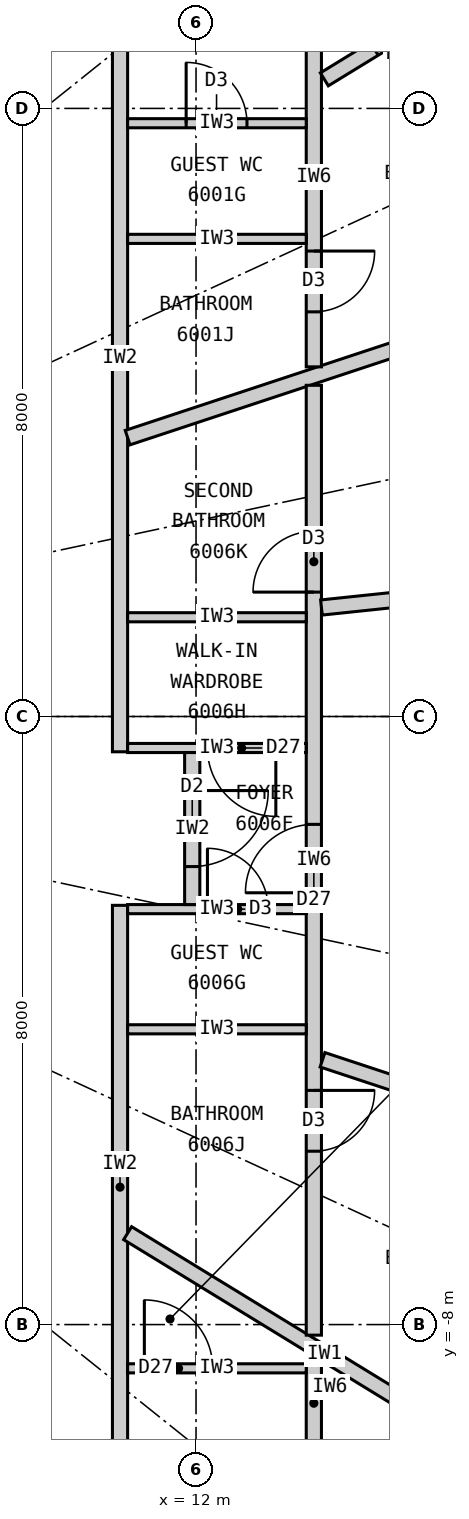
"""IFC4 building model, lengths in metres.
Left out: names, types, materials, properties, quantities, classifications, styles, units other than length and angle.
Written with IfcOpenShell. Run it as: python <this file> out.ifc"""

import sys

from ifc_helpers import new_model, si_unit, direction, frame, frame_2d, origin, place, context, subcontext, project, spatial, rectangle, extrude, element, fill, save


model = new_model("IFC4")
c1 = context("Model", 3, precision=1e-05, world=origin(), true_north=direction((0.0, 1.0)))
c2 = subcontext(c1, "Body", "Model", "MODEL_VIEW")
j1 = project(units=[si_unit("LENGTHUNIT", "METRE"), si_unit("PLANEANGLEUNIT", "RADIAN")], contexts=[c1])
p1 = place(None, origin())
s1 = spatial("IfcSite", under=j1, at=p1, CompositionType="ELEMENT")
p2 = place(p1, origin())
s2 = spatial("IfcBuilding", under=s1, at=p2, CompositionType="ELEMENT")
p3 = place(p2, frame((0.0, 0.0, 222.6)))
s3 = spatial("IfcBuildingStorey", under=s2, at=p3, CompositionType="ELEMENT", Elevation=222.6)
p4 = place(p3, frame((11.0, -9.9, 0.0), z_axis=(0.0, 0.0, 1.0), x_axis=(0.0, 1.0, 0.0)))
e1 = element("IfcWall", 1, at=p4, inside=s3, PredefinedType="PARTITIONING", context=c2, shape_type="SweptSolid", body=[
    extrude(rectangle(XDim=7.416, YDim=0.2, at=frame_2d((3.708, 0.0))), origin(), (0.0, 0.0, 1.0), 3.12),
])
p5 = place(p3, frame((11.0, -0.464, 0.0), z_axis=(0.0, 0.0, 1.0), x_axis=(0.0, 1.0, 0.0)))
e2 = element("IfcWall", 2, at=p5, inside=s3, PredefinedType="PARTITIONING", context=c2, shape_type="SweptSolid", body=[
    extrude(rectangle(XDim=10.364, YDim=0.2, at=frame_2d((5.182, 0.0))), origin(), (0.0, 0.0, 1.0), 3.12),
])
p6 = place(p3, frame((11.1, 3.669, 0.0), z_axis=(0.0, 0.0, 1.0), x_axis=(0.949476668397, 0.313837627079, 0.0)))
e3 = element("IfcWall", 3, at=p6, inside=s3, PredefinedType="PARTITIONING", context=c2, shape_type="SweptSolid", body=[
    extrude(rectangle(XDim=8.339, YDim=0.2, at=frame_2d((4.169, 0.0))), origin(), (0.0, 0.0, 1.0), 3.12),
])
p7 = place(p3, frame((11.1, -6.797, 0.0), z_axis=(0.0, 0.0, 1.0), x_axis=(0.852799818179, -0.522237943963, 0.0)))
e4 = element("IfcWall", 4, at=p7, inside=s3, PredefinedType="PARTITIONING", context=c2, shape_type="SweptSolid", body=[
    extrude(rectangle(XDim=6.077, YDim=0.2, at=frame_2d((3.039, 0.0))), origin(), (0.0, 0.0, 1.0), 3.12),
])
p8 = place(p3, frame((13.55, 4.6, 0.0), z_axis=(0.0, 0.0, 1.0), x_axis=(0.0, 1.0, 0.0)))
e5 = element("IfcWall", 5, at=p8, inside=s3, PredefinedType="PARTITIONING", context=c2, shape_type="SweptSolid", body=[
    extrude(rectangle(XDim=5.009, YDim=0.2, at=frame_2d((2.504, 0.0))), origin(), (0.0, 0.0, 1.0), 3.12),
])
p9 = place(p8, frame((0.724, 0.0, 0.0)))
e6 = element("IfcOpeningElement", 6, at=p9, cuts=e5, PredefinedType="OPENING", context=c2, shape_type="SweptSolid", body=[
    extrude(rectangle(XDim=0.8, YDim=2.1, at=frame_2d((0.4, 1.05))), frame((0.0, 0.11, 0.0), z_axis=(0.0, -1.0, 0.0), x_axis=(1.0, 0.0, 0.0)), (0.0, 0.0, 1.0), 0.22),
])
p10 = place(p3, frame((13.688, 8.382, 0.0), z_axis=(0.0, 0.0, 1.0), x_axis=(0.852783459586, 0.522264656144, 0.0)))
e7 = element("IfcWall", 7, at=p10, inside=s3, PredefinedType="PARTITIONING", context=c2, shape_type="SweptSolid", body=[
    extrude(rectangle(XDim=3.042, YDim=0.2, at=frame_2d((1.521, 0.0))), origin(), (0.0, 0.0, 1.0), 3.12),
])
p11 = place(p10, frame((0.77, 0.0, 0.0)))
e8 = element("IfcOpeningElement", 8, at=p11, cuts=e7, PredefinedType="OPENING", context=c2, shape_type="SweptSolid", body=[
    extrude(rectangle(XDim=0.9, YDim=2.1, at=frame_2d((0.45, 1.05))), frame((0.0, 0.11, 0.0), z_axis=(0.0, -1.0, 0.0), x_axis=(1.0, 0.0, 0.0)), (0.0, 0.0, 1.0), 0.22),
])
p12 = place(p3, frame((11.1, 6.284, 0.0), z_axis=(0.0, 0.0, 1.0), x_axis=(1.0, 0.0, 0.0)))
e9 = element("IfcWall", 9, at=p12, inside=s3, PredefinedType="PARTITIONING", context=c2, shape_type="SweptSolid", body=[
    extrude(rectangle(XDim=2.35, YDim=0.12, at=frame_2d((1.175, 0.0))), origin(), (0.0, 0.0, 1.0), 3.12),
])
p13 = place(p3, frame((11.1, 7.805, 0.0), z_axis=(0.0, 0.0, 1.0), x_axis=(1.0, 0.0, 0.0)))
e10 = element("IfcWall", 10, at=p13, inside=s3, PredefinedType="PARTITIONING", context=c2, shape_type="SweptSolid", body=[
    extrude(rectangle(XDim=2.35, YDim=0.12, at=frame_2d((1.175, 0.0))), origin(), (0.0, 0.0, 1.0), 3.12),
])
p14 = place(p13, frame((0.77, 0.0, 0.0)))
e11 = element("IfcOpeningElement", 11, at=p14, cuts=e10, PredefinedType="OPENING", context=c2, shape_type="SweptSolid", body=[
    extrude(rectangle(XDim=0.8, YDim=2.1, at=frame_2d((0.4, 1.05))), frame((0.0, 0.07, 0.0), z_axis=(0.0, -1.0, 0.0), x_axis=(1.0, 0.0, 0.0)), (0.0, 0.0, 1.0), 0.14),
])
p15 = place(p3, frame((13.55, -9.609, 0.0), z_axis=(0.0, 0.0, 1.0), x_axis=(0.0, 1.0, 0.0)))
e12 = element("IfcWall", 12, at=p15, inside=s3, PredefinedType="PARTITIONING", context=c2, shape_type="SweptSolid", body=[
    extrude(rectangle(XDim=1.148, YDim=0.2, at=frame_2d((0.574, 0.0))), origin(), (0.0, 0.0, 1.0), 3.12),
])
p16 = place(p3, frame((11.1, -8.576, 0.0), z_axis=(0.0, 0.0, 1.0), x_axis=(1.0, 0.0, 0.0)))
e13 = element("IfcWall", 13, at=p16, inside=s3, PredefinedType="PARTITIONING", context=c2, shape_type="SweptSolid", body=[
    extrude(rectangle(XDim=2.35, YDim=0.12, at=frame_2d((1.175, 0.0))), origin(), (0.0, 0.0, 1.0), 3.12),
])
p17 = place(p16, frame((0.22, 0.0, 0.0)))
e14 = element("IfcOpeningElement", 14, at=p17, cuts=e13, PredefinedType="OPENING", context=c2, shape_type="SweptSolid", body=[
    extrude(rectangle(XDim=0.9, YDim=2.1, at=frame_2d((0.45, 1.05))), frame((0.0, 0.07, 0.0), z_axis=(0.0, -1.0, 0.0), x_axis=(1.0, 0.0, 0.0)), (0.0, 0.0, 1.0), 0.14),
])
p18 = place(p3, frame((13.55, -8.139, 0.0), z_axis=(0.0, 0.0, 1.0), x_axis=(0.0, 1.0, 0.0)))
e15 = element("IfcWall", 15, at=p18, inside=s3, PredefinedType="PARTITIONING", context=c2, shape_type="SweptSolid", body=[
    extrude(rectangle(XDim=12.496, YDim=0.2, at=frame_2d((6.248, 0.0))), origin(), (0.0, 0.0, 1.0), 3.12),
])
p19 = place(p18, frame((2.42, 0.0, 0.0)))
e16 = element("IfcOpeningElement", 16, at=p19, cuts=e15, PredefinedType="OPENING", context=c2, shape_type="SweptSolid", body=[
    extrude(rectangle(XDim=0.8, YDim=2.1, at=frame_2d((0.4, 1.05))), frame((0.0, 0.11, 0.0), z_axis=(0.0, -1.0, 0.0), x_axis=(1.0, 0.0, 0.0)), (0.0, 0.0, 1.0), 0.22),
])
p20 = place(p18, frame((9.776, 0.0, 0.0)))
e17 = element("IfcOpeningElement", 17, at=p20, cuts=e15, PredefinedType="OPENING", context=c2, shape_type="SweptSolid", body=[
    extrude(rectangle(XDim=0.8, YDim=2.1, at=frame_2d((0.4, 1.05))), frame((0.0, 0.11, 0.0), z_axis=(0.0, -1.0, 0.0), x_axis=(1.0, 0.0, 0.0)), (0.0, 0.0, 1.0), 0.22),
])
p21 = place(p18, frame((5.82, 0.0, 0.0)))
e18 = element("IfcOpeningElement", 18, at=p21, cuts=e15, PredefinedType="OPENING", context=c2, shape_type="SweptSolid", body=[
    extrude(rectangle(XDim=0.9, YDim=2.1, at=frame_2d((0.45, 1.05))), frame((0.0, 0.11, 0.0), z_axis=(0.0, -1.0, 0.0), x_axis=(1.0, 0.0, 0.0)), (0.0, 0.0, 1.0), 0.22),
])
p22 = place(p3, frame((13.664, -4.516, 0.0), z_axis=(0.0, 0.0, 1.0), x_axis=(0.949481375941, -0.313823384632, 0.0)))
e19 = element("IfcWall", 19, at=p22, inside=s3, PredefinedType="PARTITIONING", context=c2, shape_type="SweptSolid", body=[
    extrude(rectangle(XDim=5.638, YDim=0.2, at=frame_2d((2.819, 0.0))), origin(), (0.0, 0.0, 1.0), 3.12),
])
p23 = place(p22, frame((1.82, 0.0, 0.0)))
e20 = element("IfcOpeningElement", 20, at=p23, cuts=e19, PredefinedType="OPENING", context=c2, shape_type="SweptSolid", body=[
    extrude(rectangle(XDim=0.9, YDim=2.1, at=frame_2d((0.45, 1.05))), frame((0.0, 0.11, 0.0), z_axis=(0.0, -1.0, 0.0), x_axis=(1.0, 0.0, 0.0)), (0.0, 0.0, 1.0), 0.22),
])
p24 = place(p3, frame((13.65, 1.434, 0.0), z_axis=(0.0, 0.0, 1.0), x_axis=(0.994526954268, 0.10448031984, 0.0)))
e21 = element("IfcWall", 21, at=p24, inside=s3, PredefinedType="PARTITIONING", context=c2, shape_type="SweptSolid", body=[
    extrude(rectangle(XDim=6.837, YDim=0.2, at=frame_2d((3.418, 0.0))), origin(), (0.0, 0.0, 1.0), 2.47),
])
p25 = place(p24, frame((2.27, 0.0, 0.0)))
e22 = element("IfcOpeningElement", 22, at=p25, cuts=e21, PredefinedType="OPENING", context=c2, shape_type="SweptSolid", body=[
    extrude(rectangle(XDim=0.9, YDim=2.1, at=frame_2d((0.45, 1.05))), frame((0.0, 0.11, 0.0), z_axis=(0.0, -1.0, 0.0), x_axis=(1.0, 0.0, 0.0)), (0.0, 0.0, 1.0), 0.22),
])
p26 = place(p3, frame((11.1, -4.115, 0.0), z_axis=(0.0, 0.0, 1.0), x_axis=(1.0, 0.0, 0.0)))
e23 = element("IfcWall", 23, at=p26, inside=s3, PredefinedType="PARTITIONING", context=c2, shape_type="SweptSolid", body=[
    extrude(rectangle(XDim=2.35, YDim=0.12, at=frame_2d((1.175, 0.0))), origin(), (0.0, 0.0, 1.0), 3.12),
])
p27 = place(p3, frame((11.1, -2.534, 0.0), z_axis=(0.0, 0.0, 1.0), x_axis=(1.0, 0.0, 0.0)))
e24 = element("IfcWall", 24, at=p27, inside=s3, PredefinedType="PARTITIONING", context=c2, shape_type="SweptSolid", body=[
    extrude(rectangle(XDim=2.35, YDim=0.12, at=frame_2d((1.175, 0.0))), origin(), (0.0, 0.0, 1.0), 3.12),
])
p28 = place(p27, frame((1.05, 0.0, 0.0)))
e25 = element("IfcOpeningElement", 25, at=p28, cuts=e24, PredefinedType="OPENING", context=c2, shape_type="SweptSolid", body=[
    extrude(rectangle(XDim=0.8, YDim=2.1, at=frame_2d((0.4, 1.05))), frame((0.0, 0.07, 0.0), z_axis=(0.0, -1.0, 0.0), x_axis=(1.0, 0.0, 0.0)), (0.0, 0.0, 1.0), 0.14),
])
p29 = place(p3, frame((11.1, -0.414, 0.0), z_axis=(0.0, 0.0, 1.0), x_axis=(1.0, 0.0, 0.0)))
e26 = element("IfcWall", 26, at=p29, inside=s3, PredefinedType="PARTITIONING", context=c2, shape_type="SweptSolid", body=[
    extrude(rectangle(XDim=2.35, YDim=0.12, at=frame_2d((1.175, 0.0))), origin(), (0.0, 0.0, 1.0), 3.12),
])
p30 = place(p29, frame((1.05, 0.0, 0.0)))
e27 = element("IfcOpeningElement", 27, at=p30, cuts=e26, PredefinedType="OPENING", context=c2, shape_type="SweptSolid", body=[
    extrude(rectangle(XDim=0.9, YDim=2.1, at=frame_2d((0.45, 1.05))), frame((0.0, 0.07, 0.0), z_axis=(0.0, -1.0, 0.0), x_axis=(1.0, 0.0, 0.0)), (0.0, 0.0, 1.0), 0.14),
])
p31 = place(p3, frame((11.1, 1.306, 0.0), z_axis=(0.0, 0.0, 1.0), x_axis=(1.0, 0.0, 0.0)))
e28 = element("IfcWall", 28, at=p31, inside=s3, PredefinedType="PARTITIONING", context=c2, shape_type="SweptSolid", body=[
    extrude(rectangle(XDim=2.35, YDim=0.12, at=frame_2d((1.175, 0.0))), origin(), (0.0, 0.0, 1.0), 3.12),
])
p32 = place(p3, frame((11.95, -2.474, 0.0), z_axis=(0.0, 0.0, 1.0), x_axis=(0.0, 1.0, 0.0)))
e29 = element("IfcWall", 29, at=p32, inside=s3, PredefinedType="PARTITIONING", context=c2, shape_type="SweptSolid", body=[
    extrude(rectangle(XDim=2.0, YDim=0.2, at=frame_2d((1.0, 0.0))), origin(), (0.0, 0.0, 1.0), 3.12),
])
p33 = place(p32, frame((0.5, 0.0, 0.0)))
e30 = element("IfcOpeningElement", 30, at=p33, cuts=e29, PredefinedType="OPENING", context=c2, shape_type="SweptSolid", body=[
    extrude(rectangle(XDim=1.0, YDim=2.2, at=frame_2d((0.5, 1.1))), frame((0.0, 0.11, 0.0), z_axis=(0.0, -1.0, 0.0), x_axis=(1.0, 0.0, 0.0)), (0.0, 0.0, 1.0), 0.22),
])
p34 = place(p9, origin())
e31 = element("IfcDoor", 31, at=p34, inside=s3, OperationType="SINGLE_SWING_RIGHT", PredefinedType="DOOR", context=c2, shape_type="SweptSolid", body=[
    extrude(rectangle(XDim=0.8, YDim=2.1, at=frame_2d((0.4, 1.05))), frame((0.0, 0.025, 0.0), z_axis=(0.0, -1.0, 0.0), x_axis=(1.0, 0.0, 0.0)), (0.0, 0.0, 1.0), 0.05),
])
fill(e6, e31)
p35 = place(p14, origin())
e32 = element("IfcDoor", 32, at=p35, inside=s3, OperationType="SINGLE_SWING_LEFT", PredefinedType="DOOR", context=c2, shape_type="SweptSolid", body=[
    extrude(rectangle(XDim=0.8, YDim=2.1, at=frame_2d((0.4, 1.05))), frame((0.0, 0.025, 0.0), z_axis=(0.0, -1.0, 0.0), x_axis=(1.0, 0.0, 0.0)), (0.0, 0.0, 1.0), 0.05),
])
fill(e11, e32)
p36 = place(p17, origin())
e33 = element("IfcDoor", 33, at=p36, inside=s3, OperationType="SINGLE_SWING_LEFT", PredefinedType="DOOR", context=c2, shape_type="SweptSolid", body=[
    extrude(rectangle(XDim=0.9, YDim=2.1, at=frame_2d((0.45, 1.05))), frame((0.0, 0.025, 0.0), z_axis=(0.0, -1.0, 0.0), x_axis=(1.0, 0.0, 0.0)), (0.0, 0.0, 1.0), 0.05),
])
fill(e14, e33)
p37 = place(p33, origin())
e34 = element("IfcDoor", 34, at=p37, inside=s3, OperationType="SINGLE_SWING_RIGHT", PredefinedType="DOOR", context=c2, shape_type="SweptSolid", body=[
    extrude(rectangle(XDim=1.0, YDim=2.2, at=frame_2d((0.5, 1.1))), frame((0.0, 0.025, 0.0), z_axis=(0.0, -1.0, 0.0), x_axis=(1.0, 0.0, 0.0)), (0.0, 0.0, 1.0), 0.05),
])
fill(e30, e34)
p38 = place(p19, origin())
e35 = element("IfcDoor", 35, at=p38, inside=s3, OperationType="SINGLE_SWING_RIGHT", PredefinedType="DOOR", context=c2, shape_type="SweptSolid", body=[
    extrude(rectangle(XDim=0.8, YDim=2.1, at=frame_2d((0.4, 1.05))), frame((0.0, 0.025, 0.0), z_axis=(0.0, -1.0, 0.0), x_axis=(1.0, 0.0, 0.0)), (0.0, 0.0, 1.0), 0.05),
])
fill(e16, e35)
p39 = place(p28, origin())
e36 = element("IfcDoor", 36, at=p39, inside=s3, OperationType="SINGLE_SWING_LEFT", PredefinedType="DOOR", context=c2, shape_type="SweptSolid", body=[
    extrude(rectangle(XDim=0.8, YDim=2.1, at=frame_2d((0.4, 1.05))), frame((0.0, 0.025, 0.0), z_axis=(0.0, -1.0, 0.0), x_axis=(1.0, 0.0, 0.0)), (0.0, 0.0, 1.0), 0.05),
])
fill(e25, e36)
p40 = place(p30, origin())
e37 = element("IfcDoor", 37, at=p40, inside=s3, OperationType="SINGLE_SWING_RIGHT", PredefinedType="DOOR", context=c2, shape_type="SweptSolid", body=[
    extrude(rectangle(XDim=0.9, YDim=2.1, at=frame_2d((0.45, 1.05))), frame((0.0, 0.025, 0.0), z_axis=(0.0, -1.0, 0.0), x_axis=(1.0, 0.0, 0.0)), (0.0, 0.0, 1.0), 0.05),
])
fill(e27, e37)
p41 = place(p20, origin())
e38 = element("IfcDoor", 38, at=p41, inside=s3, OperationType="SINGLE_SWING_LEFT", PredefinedType="DOOR", context=c2, shape_type="SweptSolid", body=[
    extrude(rectangle(XDim=0.8, YDim=2.1, at=frame_2d((0.4, 1.05))), frame((0.0, 0.025, 0.0), z_axis=(0.0, -1.0, 0.0), x_axis=(1.0, 0.0, 0.0)), (0.0, 0.0, 1.0), 0.05),
])
fill(e17, e38)
p42 = place(p21, origin())
e39 = element("IfcDoor", 39, at=p42, inside=s3, OperationType="SINGLE_SWING_LEFT", PredefinedType="DOOR", context=c2, shape_type="SweptSolid", body=[
    extrude(rectangle(XDim=0.9, YDim=2.1, at=frame_2d((0.45, 1.05))), frame((0.0, 0.025, 0.0), z_axis=(0.0, -1.0, 0.0), x_axis=(1.0, 0.0, 0.0)), (0.0, 0.0, 1.0), 0.05),
])
fill(e18, e39)
save(model, sys.argv[1])
